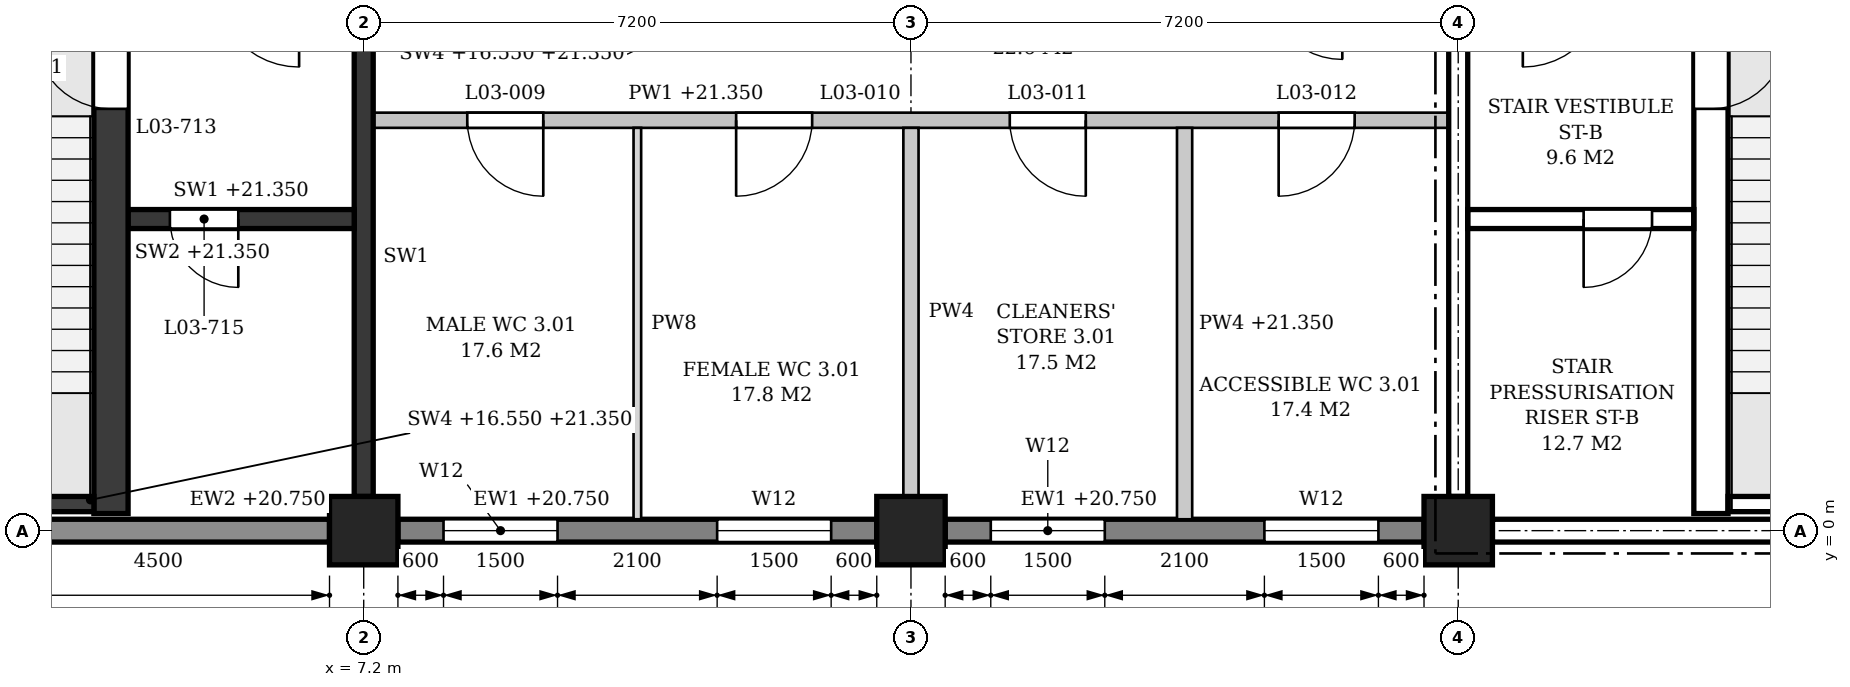
"""IFC4 building model, lengths in metres.
Left out: names, types, materials, properties, quantities, classifications, styles, units other than length and angle.
Written with IfcOpenShell. Run it as: python <this file> out.ifc"""

import sys

from ifc_helpers import new_model, si_unit, direction, frame, frame_2d, origin, origin_2d, place, context, subcontext, project, spatial, polyline, rectangle, outline, extrude, element, fill, save


model = new_model("IFC4")
c1 = context("Model", 3, precision=1e-05, world=origin(), true_north=direction((0.0, 1.0)))
c2 = subcontext(c1, "Body", "Model", "MODEL_VIEW")
j1 = project(units=[si_unit("LENGTHUNIT", "METRE"), si_unit("PLANEANGLEUNIT", "RADIAN")], contexts=[c1])
p1 = place(None, origin())
s1 = spatial("IfcSite", under=j1, at=p1, CompositionType="ELEMENT")
p2 = place(p1, origin())
s2 = spatial("IfcBuilding", under=s1, at=p2, CompositionType="ELEMENT")
p3 = place(p2, frame((0.0, 0.0, 16.8)))
s3 = spatial("IfcBuildingStorey", under=s2, at=p3, CompositionType="ELEMENT", Elevation=16.8)
for number, where, z_axis, x_axis in (
    (1, (7.2, 0.0, 0.0), (0.0, 0.0, 1.0), (1.0, 0.0, 0.0)),
    (2, (14.4, 0.0, 0.0), (0.0, 0.0, 1.0), (1.0, 0.0, 0.0)),
    (3, (21.6, 0.0, 0.0), (0.0, 0.0, 1.0), (1.0, 0.0, 0.0)),
):
    element("IfcColumn", number, at=place(p3, frame(where, z_axis=z_axis, x_axis=x_axis)), inside=s3, PredefinedType="COLUMN", context=c2, shape_type="SweptSolid", body=[
        extrude(rectangle(XDim=0.9, YDim=0.9, at=origin_2d()), origin(), (0.0, 0.0, 1.0), 4.8),
    ])
p4 = place(p3, frame((0.45, 0.0, 0.0), z_axis=(0.0, 0.0, 1.0), x_axis=(1.0, 0.0, 0.0)))
e4 = element("IfcWall", 4, at=p4, inside=s3, PredefinedType="STANDARD", context=c2, shape_type="SweptSolid", body=[
    extrude(rectangle(XDim=6.3, YDim=0.3, at=frame_2d((3.15, 0.0))), origin(), (0.0, 0.0, 1.0), 3.95),
])
p5 = place(p4, frame((0.9, 0.0, 0.9)))
e5 = element("IfcOpeningElement", 5, at=p5, cuts=e4, PredefinedType="OPENING", context=c2, shape_type="SweptSolid", body=[
    extrude(outline(polyline([(0.0, 0.0), (0.9, 0.0), (0.9, 2.05), (0.45, 2.5), (0.0, 2.05), (0.0, 0.0)])), frame((0.0, 0.16, 0.0), z_axis=(0.0, -1.0, 0.0), x_axis=(1.0, 0.0, 0.0)), (0.0, 0.0, 1.0), 0.32),
])
p6 = place(p3, frame((7.65, 0.0, 0.0), z_axis=(0.0, 0.0, 1.0), x_axis=(1.0, 0.0, 0.0)))
e6 = element("IfcWall", 6, at=p6, inside=s3, PredefinedType="STANDARD", context=c2, shape_type="SweptSolid", body=[
    extrude(rectangle(XDim=6.3, YDim=0.3, at=frame_2d((3.15, 0.0))), origin(), (0.0, 0.0, 1.0), 3.95),
])
p7 = place(p6, frame((0.6, 0.0, 0.9)))
e7 = element("IfcOpeningElement", 7, at=p7, cuts=e6, PredefinedType="OPENING", context=c2, shape_type="SweptSolid", body=[
    extrude(outline(polyline([(0.0, 0.0), (1.5, 0.0), (1.5, 1.75), (0.75, 2.5), (0.0, 1.75), (0.0, 0.0)])), frame((0.0, 0.16, 0.0), z_axis=(0.0, -1.0, 0.0), x_axis=(1.0, 0.0, 0.0)), (0.0, 0.0, 1.0), 0.32),
])
p8 = place(p6, frame((4.2, 0.0, 0.9)))
e8 = element("IfcOpeningElement", 8, at=p8, cuts=e6, PredefinedType="OPENING", context=c2, shape_type="SweptSolid", body=[
    extrude(outline(polyline([(0.0, 0.0), (1.5, 0.0), (1.5, 1.75), (0.75, 2.5), (0.0, 1.75), (0.0, 0.0)])), frame((0.0, 0.16, 0.0), z_axis=(0.0, -1.0, 0.0), x_axis=(1.0, 0.0, 0.0)), (0.0, 0.0, 1.0), 0.32),
])
p9 = place(p3, frame((14.85, 0.0, 0.0), z_axis=(0.0, 0.0, 1.0), x_axis=(1.0, 0.0, 0.0)))
e9 = element("IfcWall", 9, at=p9, inside=s3, PredefinedType="STANDARD", context=c2, shape_type="SweptSolid", body=[
    extrude(rectangle(XDim=6.3, YDim=0.3, at=frame_2d((3.15, 0.0))), origin(), (0.0, 0.0, 1.0), 3.95),
])
p10 = place(p9, frame((0.6, 0.0, 0.9)))
e10 = element("IfcOpeningElement", 10, at=p10, cuts=e9, PredefinedType="OPENING", context=c2, shape_type="SweptSolid", body=[
    extrude(outline(polyline([(0.0, 0.0), (1.5, 0.0), (1.5, 1.75), (0.75, 2.5), (0.0, 1.75), (0.0, 0.0)])), frame((0.0, 0.16, 0.0), z_axis=(0.0, -1.0, 0.0), x_axis=(1.0, 0.0, 0.0)), (0.0, 0.0, 1.0), 0.32),
])
p11 = place(p9, frame((4.2, 0.0, 0.9)))
e11 = element("IfcOpeningElement", 11, at=p11, cuts=e9, PredefinedType="OPENING", context=c2, shape_type="SweptSolid", body=[
    extrude(outline(polyline([(0.0, 0.0), (1.5, 0.0), (1.5, 1.75), (0.75, 2.5), (0.0, 1.75), (0.0, 0.0)])), frame((0.0, 0.16, 0.0), z_axis=(0.0, -1.0, 0.0), x_axis=(1.0, 0.0, 0.0)), (0.0, 0.0, 1.0), 0.32),
])
p12 = place(p3, frame((22.05, 0.0, 0.0), z_axis=(0.0, 0.0, 1.0), x_axis=(1.0, 0.0, 0.0)))
e12 = element("IfcWall", 12, at=p12, inside=s3, PredefinedType="STANDARD", context=c2, shape_type="SweptSolid", body=[
    extrude(rectangle(XDim=6.3, YDim=0.3, at=frame_2d((3.15, 0.0))), origin(), (0.0, 0.0, 1.0), 3.95),
])
p13 = place(p12, frame((4.5, 0.0, 0.9)))
e13 = element("IfcOpeningElement", 13, at=p13, cuts=e12, PredefinedType="OPENING", context=c2, shape_type="SweptSolid", body=[
    extrude(outline(polyline([(0.0, 0.0), (0.9, 0.0), (0.9, 2.05), (0.45, 2.5), (0.0, 2.05), (0.0, 0.0)])), frame((0.0, 0.16, 0.0), z_axis=(0.0, -1.0, 0.0), x_axis=(1.0, 0.0, 0.0)), (0.0, 0.0, 1.0), 0.32),
])
p14 = place(p3, frame((7.2, 0.45, 0.0), z_axis=(0.0, 0.0, 1.0), x_axis=(0.0, 1.0, 0.0)))
e14 = element("IfcWall", 14, at=p14, inside=s3, PredefinedType="SHEAR", context=c2, shape_type="SweptSolid", body=[
    extrude(rectangle(XDim=6.3, YDim=0.25, at=frame_2d((3.15, 0.0))), origin(), (0.0, 0.0, 1.0), 3.8),
])
p15 = place(p3, frame((2.25, 0.35, -0.25), z_axis=(0.0, 0.0, 1.0), x_axis=(1.0, 0.0, 0.0)))
e15 = element("IfcWall", 15, at=p15, inside=s3, PredefinedType="SHEAR", context=c2, shape_type="SweptSolid", body=[
    extrude(rectangle(XDim=1.4, YDim=0.2, at=frame_2d((0.7, 0.0))), origin(), (0.0, 0.0, 1.0), 4.8),
])
p16 = place(p3, frame((3.875, 0.225, 0.0), z_axis=(0.0, 0.0, 1.0), x_axis=(0.0, 1.0, 0.0)))
e16 = element("IfcWall", 16, at=p16, inside=s3, PredefinedType="SHEAR", context=c2, shape_type="SweptSolid", body=[
    extrude(rectangle(XDim=6.85, YDim=0.45, at=frame_2d((3.425, 0.0))), origin(), (0.0, 0.0, 1.0), 4.55),
])
p17 = place(p16, frame((5.325, 0.0, 0.0)))
e17 = element("IfcOpeningElement", 17, at=p17, cuts=e16, PredefinedType="OPENING", context=c2, shape_type="SweptSolid", body=[
    extrude(rectangle(XDim=1.0, YDim=2.1, at=frame_2d((0.5, 1.05))), frame((0.0, 0.235, 0.0), z_axis=(0.0, -1.0, 0.0), x_axis=(1.0, 0.0, 0.0)), (0.0, 0.0, 1.0), 0.47),
])
p18 = place(p3, frame((4.1, 4.1, 0.0), z_axis=(0.0, 0.0, 1.0), x_axis=(1.0, 0.0, 0.0)))
e18 = element("IfcWall", 18, at=p18, inside=s3, PredefinedType="SHEAR", context=c2, shape_type="SweptSolid", body=[
    extrude(rectangle(XDim=2.975, YDim=0.25, at=frame_2d((1.487, 0.0))), origin(), (0.0, 0.0, 1.0), 4.55),
])
p19 = place(p18, frame((0.55, 0.0, 0.0)))
e19 = element("IfcOpeningElement", 19, at=p19, cuts=e18, PredefinedType="OPENING", context=c2, shape_type="SweptSolid", body=[
    extrude(rectangle(XDim=0.9, YDim=2.1, at=frame_2d((0.45, 1.05))), frame((0.0, 0.135, 0.0), z_axis=(0.0, -1.0, 0.0), x_axis=(1.0, 0.0, 0.0)), (0.0, 0.0, 1.0), 0.27),
])
p20 = place(p3, frame((21.6, 0.45, 0.0), z_axis=(0.0, 0.0, 1.0), x_axis=(0.0, 1.0, 0.0)))
e20 = element("IfcWall", 20, at=p20, inside=s3, PredefinedType="SHEAR", context=c2, shape_type="SweptSolid", body=[
    extrude(rectangle(XDim=6.3, YDim=0.25, at=frame_2d((3.15, 0.0))), origin(), (0.0, 0.0, 1.0), 3.8),
])
p21 = place(p3, frame((25.15, 0.35, -0.25), z_axis=(0.0, 0.0, 1.0), x_axis=(1.0, 0.0, 0.0)))
e21 = element("IfcWall", 21, at=p21, inside=s3, PredefinedType="SHEAR", context=c2, shape_type="SweptSolid", body=[
    extrude(rectangle(XDim=1.4, YDim=0.2, at=frame_2d((0.7, 0.0))), origin(), (0.0, 0.0, 1.0), 4.8),
])
p22 = place(p3, frame((24.925, 0.225, 0.0), z_axis=(0.0, 0.0, 1.0), x_axis=(0.0, 1.0, 0.0)))
e22 = element("IfcWall", 22, at=p22, inside=s3, PredefinedType="SHEAR", context=c2, shape_type="SweptSolid", body=[
    extrude(rectangle(XDim=6.85, YDim=0.45, at=frame_2d((3.425, 0.0))), origin(), (0.0, 0.0, 1.0), 4.55),
])
p23 = place(p22, frame((5.325, 0.0, 0.0)))
e23 = element("IfcOpeningElement", 23, at=p23, cuts=e22, PredefinedType="OPENING", context=c2, shape_type="SweptSolid", body=[
    extrude(rectangle(XDim=1.0, YDim=2.1, at=frame_2d((0.5, 1.05))), frame((0.0, 0.235, 0.0), z_axis=(0.0, -1.0, 0.0), x_axis=(1.0, 0.0, 0.0)), (0.0, 0.0, 1.0), 0.47),
])
p24 = place(p3, frame((21.725, 4.1, 0.0), z_axis=(0.0, 0.0, 1.0), x_axis=(1.0, 0.0, 0.0)))
e24 = element("IfcWall", 24, at=p24, inside=s3, PredefinedType="SHEAR", context=c2, shape_type="SweptSolid", body=[
    extrude(rectangle(XDim=2.975, YDim=0.25, at=frame_2d((1.487, 0.0))), origin(), (0.0, 0.0, 1.0), 4.55),
])
p25 = place(p24, frame((1.525, 0.0, 0.0)))
e25 = element("IfcOpeningElement", 25, at=p25, cuts=e24, PredefinedType="OPENING", context=c2, shape_type="SweptSolid", body=[
    extrude(rectangle(XDim=0.9, YDim=2.1, at=frame_2d((0.45, 1.05))), frame((0.0, 0.135, 0.0), z_axis=(0.0, -1.0, 0.0), x_axis=(1.0, 0.0, 0.0)), (0.0, 0.0, 1.0), 0.27),
])
p26 = place(p3, frame((7.325, 5.4, 0.0), z_axis=(0.0, 0.0, 1.0), x_axis=(1.0, 0.0, 0.0)))
e26 = element("IfcWall", 26, at=p26, inside=s3, PredefinedType="PARTITIONING", context=c2, shape_type="SweptSolid", body=[
    extrude(outline(polyline([(0.0, 0.0), (14.15, 0.0), (14.15, 3.8), (14.025, 3.8), (14.025, 4.55), (7.325, 4.55), (7.325, 3.8), (6.825, 3.8), (6.825, 4.55), (0.125, 4.55), (0.125, 3.8), (0.0, 3.8), (0.0, 0.0)])), frame((0.0, 0.1, 0.0), z_axis=(0.0, -1.0, 0.0), x_axis=(1.0, 0.0, 0.0)), (0.0, 0.0, 1.0), 0.2),
])
p27 = place(p26, frame((1.238, 0.0, 0.0)))
e27 = element("IfcOpeningElement", 27, at=p27, cuts=e26, PredefinedType="OPENING", context=c2, shape_type="SweptSolid", body=[
    extrude(rectangle(XDim=1.0, YDim=2.1, at=frame_2d((0.5, 1.05))), frame((0.0, 0.11, 0.0), z_axis=(0.0, -1.0, 0.0), x_axis=(1.0, 0.0, 0.0)), (0.0, 0.0, 1.0), 0.22),
])
p28 = place(p26, frame((4.775, 0.0, 0.0)))
e28 = element("IfcOpeningElement", 28, at=p28, cuts=e26, PredefinedType="OPENING", context=c2, shape_type="SweptSolid", body=[
    extrude(rectangle(XDim=1.0, YDim=2.1, at=frame_2d((0.5, 1.05))), frame((0.0, 0.11, 0.0), z_axis=(0.0, -1.0, 0.0), x_axis=(1.0, 0.0, 0.0)), (0.0, 0.0, 1.0), 0.22),
])
p29 = place(p26, frame((8.375, 0.0, 0.0)))
e29 = element("IfcOpeningElement", 29, at=p29, cuts=e26, PredefinedType="OPENING", context=c2, shape_type="SweptSolid", body=[
    extrude(rectangle(XDim=1.0, YDim=2.1, at=frame_2d((0.5, 1.05))), frame((0.0, 0.11, 0.0), z_axis=(0.0, -1.0, 0.0), x_axis=(1.0, 0.0, 0.0)), (0.0, 0.0, 1.0), 0.22),
])
p30 = place(p26, frame((11.913, 0.0, 0.0)))
e30 = element("IfcOpeningElement", 30, at=p30, cuts=e26, PredefinedType="OPENING", context=c2, shape_type="SweptSolid", body=[
    extrude(rectangle(XDim=1.0, YDim=2.1, at=frame_2d((0.5, 1.05))), frame((0.0, 0.11, 0.0), z_axis=(0.0, -1.0, 0.0), x_axis=(1.0, 0.0, 0.0)), (0.0, 0.0, 1.0), 0.22),
])
p31 = place(p3, frame((10.8, 0.15, 0.0), z_axis=(0.0, 0.0, 1.0), x_axis=(0.0, 1.0, 0.0)))
e31 = element("IfcWall", 31, at=p31, inside=s3, PredefinedType="PARTITIONING", context=c2, shape_type="SweptSolid", body=[
    extrude(rectangle(XDim=5.15, YDim=0.1, at=frame_2d((2.575, 0.0))), origin(), (0.0, 0.0, 1.0), 3.8),
])
p32 = place(p3, frame((14.4, 0.45, 0.0), z_axis=(0.0, 0.0, 1.0), x_axis=(0.0, 1.0, 0.0)))
e32 = element("IfcWall", 32, at=p32, inside=s3, PredefinedType="PARTITIONING", context=c2, shape_type="SweptSolid", body=[
    extrude(rectangle(XDim=4.85, YDim=0.2, at=frame_2d((2.425, 0.0))), origin(), (0.0, 0.0, 1.0), 3.8),
])
p33 = place(p3, frame((18.0, 0.15, 0.0), z_axis=(0.0, 0.0, 1.0), x_axis=(0.0, 1.0, 0.0)))
e33 = element("IfcWall", 33, at=p33, inside=s3, PredefinedType="PARTITIONING", context=c2, shape_type="SweptSolid", body=[
    extrude(outline(polyline([(0.0, 0.0), (5.15, 0.0), (5.15, 4.55), (0.1, 4.55), (0.1, 3.95), (0.0, 3.95), (0.0, 0.0)])), frame((0.0, 0.1, 0.0), z_axis=(0.0, -1.0, 0.0), x_axis=(1.0, 0.0, 0.0)), (0.0, 0.0, 1.0), 0.2),
])
p34 = place(p7, origin())
e34 = element("IfcWindow", 34, at=p34, inside=s3, PartitioningType="SINGLE_PANEL", PredefinedType="WINDOW", context=c2, shape_type="SweptSolid", body=[
    extrude(outline(polyline([(0.0, 0.0), (1.5, 0.0), (1.5, 1.75), (0.75, 2.5), (0.0, 1.75), (0.0, 0.0)])), frame((0.0, 0.03, 0.0), z_axis=(0.0, -1.0, 0.0), x_axis=(1.0, 0.0, 0.0)), (0.0, 0.0, 1.0), 0.06),
])
fill(e7, e34)
p35 = place(p8, origin())
e35 = element("IfcWindow", 35, at=p35, inside=s3, PartitioningType="SINGLE_PANEL", PredefinedType="WINDOW", context=c2, shape_type="SweptSolid", body=[
    extrude(outline(polyline([(0.0, 0.0), (1.5, 0.0), (1.5, 1.75), (0.75, 2.5), (0.0, 1.75), (0.0, 0.0)])), frame((0.0, 0.03, 0.0), z_axis=(0.0, -1.0, 0.0), x_axis=(1.0, 0.0, 0.0)), (0.0, 0.0, 1.0), 0.06),
])
fill(e8, e35)
p36 = place(p10, origin())
e36 = element("IfcWindow", 36, at=p36, inside=s3, PartitioningType="SINGLE_PANEL", PredefinedType="WINDOW", context=c2, shape_type="SweptSolid", body=[
    extrude(outline(polyline([(0.0, 0.0), (1.5, 0.0), (1.5, 1.75), (0.75, 2.5), (0.0, 1.75), (0.0, 0.0)])), frame((0.0, 0.03, 0.0), z_axis=(0.0, -1.0, 0.0), x_axis=(1.0, 0.0, 0.0)), (0.0, 0.0, 1.0), 0.06),
])
fill(e10, e36)
p37 = place(p11, origin())
e37 = element("IfcWindow", 37, at=p37, inside=s3, PartitioningType="SINGLE_PANEL", PredefinedType="WINDOW", context=c2, shape_type="SweptSolid", body=[
    extrude(outline(polyline([(0.0, 0.0), (1.5, 0.0), (1.5, 1.75), (0.75, 2.5), (0.0, 1.75), (0.0, 0.0)])), frame((0.0, 0.03, 0.0), z_axis=(0.0, -1.0, 0.0), x_axis=(1.0, 0.0, 0.0)), (0.0, 0.0, 1.0), 0.06),
])
fill(e11, e37)
p38 = place(p17, origin())
e38 = element("IfcDoor", 38, at=p38, inside=s3, OperationType="SINGLE_SWING_RIGHT", PredefinedType="DOOR", context=c2, shape_type="SweptSolid", body=[
    extrude(rectangle(XDim=1.0, YDim=2.1, at=frame_2d((0.5, 1.05))), frame((0.0, 0.025, 0.0), z_axis=(0.0, -1.0, 0.0), x_axis=(1.0, 0.0, 0.0)), (0.0, 0.0, 1.0), 0.05),
])
fill(e17, e38)
p39 = place(p19, frame((0.9, 0.0, 0.0), z_axis=(0.0, 0.0, 1.0), x_axis=(-1.0, 0.0, 0.0)))
e39 = element("IfcDoor", 39, at=p39, inside=s3, OperationType="SINGLE_SWING_LEFT", PredefinedType="DOOR", context=c2, shape_type="SweptSolid", body=[
    extrude(rectangle(XDim=0.9, YDim=2.1, at=frame_2d((0.45, 1.05))), frame((0.0, 0.025, 0.0), z_axis=(0.0, -1.0, 0.0), x_axis=(1.0, 0.0, 0.0)), (0.0, 0.0, 1.0), 0.05),
])
fill(e19, e39)
p40 = place(p23, frame((1.0, 0.0, 0.0), z_axis=(0.0, 0.0, 1.0), x_axis=(-1.0, 0.0, 0.0)))
e40 = element("IfcDoor", 40, at=p40, inside=s3, OperationType="SINGLE_SWING_LEFT", PredefinedType="DOOR", context=c2, shape_type="SweptSolid", body=[
    extrude(rectangle(XDim=1.0, YDim=2.1, at=frame_2d((0.5, 1.05))), frame((0.0, 0.025, 0.0), z_axis=(0.0, -1.0, 0.0), x_axis=(1.0, 0.0, 0.0)), (0.0, 0.0, 1.0), 0.05),
])
fill(e23, e40)
p41 = place(p25, frame((0.9, 0.0, 0.0), z_axis=(0.0, 0.0, 1.0), x_axis=(-1.0, 0.0, 0.0)))
e41 = element("IfcDoor", 41, at=p41, inside=s3, OperationType="SINGLE_SWING_RIGHT", PredefinedType="DOOR", context=c2, shape_type="SweptSolid", body=[
    extrude(rectangle(XDim=0.9, YDim=2.1, at=frame_2d((0.45, 1.05))), frame((0.0, 0.025, 0.0), z_axis=(0.0, -1.0, 0.0), x_axis=(1.0, 0.0, 0.0)), (0.0, 0.0, 1.0), 0.05),
])
fill(e25, e41)
p42 = place(p27, frame((1.0, 0.0, 0.0), z_axis=(0.0, 0.0, 1.0), x_axis=(-1.0, 0.0, 0.0)))
e42 = element("IfcDoor", 42, at=p42, inside=s3, OperationType="SINGLE_SWING_LEFT", PredefinedType="DOOR", context=c2, shape_type="SweptSolid", body=[
    extrude(rectangle(XDim=1.0, YDim=2.1, at=frame_2d((0.5, 1.05))), frame((0.0, 0.025, 0.0), z_axis=(0.0, -1.0, 0.0), x_axis=(1.0, 0.0, 0.0)), (0.0, 0.0, 1.0), 0.05),
])
fill(e27, e42)
p43 = place(p28, frame((1.0, 0.0, 0.0), z_axis=(0.0, 0.0, 1.0), x_axis=(-1.0, 0.0, 0.0)))
e43 = element("IfcDoor", 43, at=p43, inside=s3, OperationType="SINGLE_SWING_RIGHT", PredefinedType="DOOR", context=c2, shape_type="SweptSolid", body=[
    extrude(rectangle(XDim=1.0, YDim=2.1, at=frame_2d((0.5, 1.05))), frame((0.0, 0.025, 0.0), z_axis=(0.0, -1.0, 0.0), x_axis=(1.0, 0.0, 0.0)), (0.0, 0.0, 1.0), 0.05),
])
fill(e28, e43)
p44 = place(p29, frame((1.0, 0.0, 0.0), z_axis=(0.0, 0.0, 1.0), x_axis=(-1.0, 0.0, 0.0)))
e44 = element("IfcDoor", 44, at=p44, inside=s3, OperationType="SINGLE_SWING_LEFT", PredefinedType="DOOR", context=c2, shape_type="SweptSolid", body=[
    extrude(rectangle(XDim=1.0, YDim=2.1, at=frame_2d((0.5, 1.05))), frame((0.0, 0.025, 0.0), z_axis=(0.0, -1.0, 0.0), x_axis=(1.0, 0.0, 0.0)), (0.0, 0.0, 1.0), 0.05),
])
fill(e29, e44)
p45 = place(p30, frame((1.0, 0.0, 0.0), z_axis=(0.0, 0.0, 1.0), x_axis=(-1.0, 0.0, 0.0)))
e45 = element("IfcDoor", 45, at=p45, inside=s3, OperationType="SINGLE_SWING_RIGHT", PredefinedType="DOOR", context=c2, shape_type="SweptSolid", body=[
    extrude(rectangle(XDim=1.0, YDim=2.1, at=frame_2d((0.5, 1.05))), frame((0.0, 0.025, 0.0), z_axis=(0.0, -1.0, 0.0), x_axis=(1.0, 0.0, 0.0)), (0.0, 0.0, 1.0), 0.05),
])
fill(e30, e45)
save(model, sys.argv[1])
